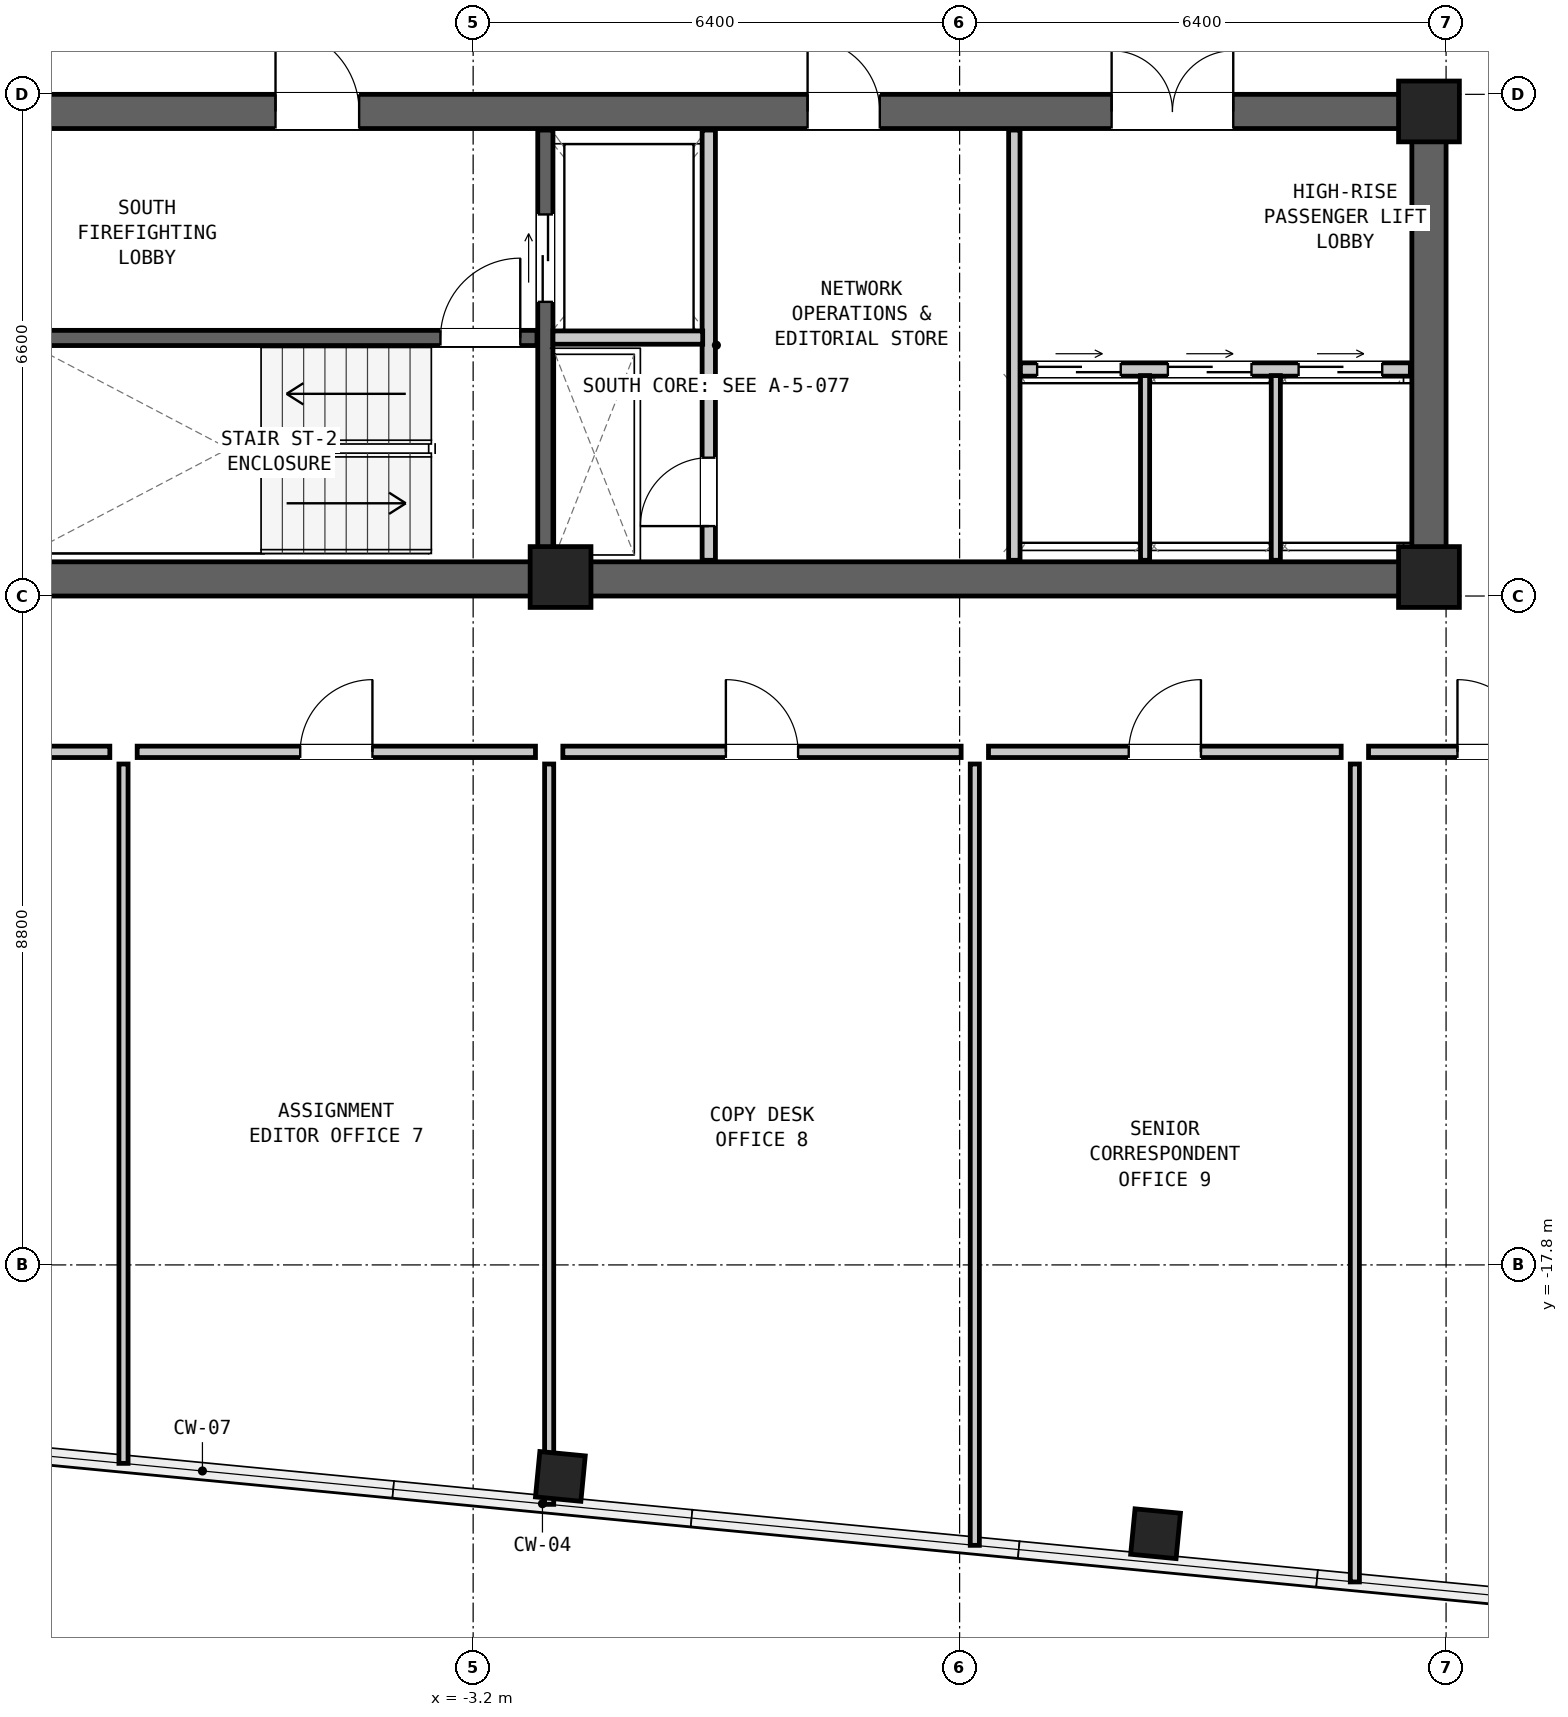
"""IFC4 building model, lengths in metres.
Left out: names, types, materials, properties, quantities, classifications, styles, units other than length and angle.
Written with IfcOpenShell. Run it as: python <this file> out.ifc"""

import sys

from ifc_helpers import new_model, si_unit, direction, frame, frame_2d, origin, origin_2d, place, context, subcontext, project, spatial, rectangle, hollow_rectangle, extrude, element, fill, save


model = new_model("IFC4")
c1 = context("Model", 3, precision=1e-05, world=origin(), true_north=direction((0.0, 1.0)))
c2 = subcontext(c1, "Body", "Model", "MODEL_VIEW")
j1 = project(units=[si_unit("LENGTHUNIT", "METRE"), si_unit("PLANEANGLEUNIT", "RADIAN")], contexts=[c1])
p1 = place(None, origin())
s1 = spatial("IfcSite", under=j1, at=p1, CompositionType="ELEMENT")
p2 = place(p1, origin())
s2 = spatial("IfcBuilding", under=s1, at=p2, CompositionType="ELEMENT")
p3 = place(p2, frame((0.0, 0.0, 252.0)))
s3 = spatial("IfcBuildingStorey", under=s2, at=p3, CompositionType="ELEMENT", Elevation=252.0)
p4 = place(p3, frame((-9.6, -8.775, 0.0), z_axis=(0.0, 0.0, 1.0), x_axis=(1.0, 0.0, 0.0)))
e1 = element("IfcWall", 1, at=p4, inside=s3, PredefinedType="SHEAR", context=c2, shape_type="SweptSolid", body=[
    extrude(rectangle(XDim=19.2, YDim=0.45, at=frame_2d((9.6, 0.0))), origin(), (0.0, 0.0, 1.0), 3.05),
])
p5 = place(p3, frame((-9.6, -2.625, 0.0), z_axis=(0.0, 0.0, 1.0), x_axis=(1.0, 0.0, 0.0)))
e2 = element("IfcWall", 2, at=p5, inside=s3, PredefinedType="SHEAR", context=c2, shape_type="SweptSolid", body=[
    extrude(rectangle(XDim=19.2, YDim=0.45, at=frame_2d((9.6, 0.0))), origin(), (0.0, 0.0, 1.0), 3.05),
])
p6 = place(p5, frame((3.8, 0.0, 0.0)))
e3 = element("IfcOpeningElement", 3, at=p6, cuts=e2, PredefinedType="OPENING", context=c2, shape_type="SweptSolid", body=[
    extrude(rectangle(XDim=1.1, YDim=2.08, at=frame_2d((0.55, 1.04))), frame((0.0, 0.237, 0.0), z_axis=(0.0, -1.0, 0.0), x_axis=(1.0, 0.0, 0.0)), (0.0, 0.0, 1.0), 0.474),
])
p7 = place(p5, frame((10.8, 0.0, 0.0)))
e4 = element("IfcOpeningElement", 4, at=p7, cuts=e2, PredefinedType="OPENING", context=c2, shape_type="SweptSolid", body=[
    extrude(rectangle(XDim=0.95, YDim=2.1, at=frame_2d((0.475, 1.05))), frame((0.0, 0.237, 0.0), z_axis=(0.0, -1.0, 0.0), x_axis=(1.0, 0.0, 0.0)), (0.0, 0.0, 1.0), 0.474),
])
p8 = place(p5, frame((14.8, 0.0, 0.0)))
e5 = element("IfcOpeningElement", 5, at=p8, cuts=e2, PredefinedType="OPENING", context=c2, shape_type="SweptSolid", body=[
    extrude(rectangle(XDim=1.6, YDim=2.12, at=frame_2d((0.8, 1.06))), frame((0.0, 0.237, 0.0), z_axis=(0.0, -1.0, 0.0), x_axis=(1.0, 0.0, 0.0)), (0.0, 0.0, 1.0), 0.474),
])
p9 = place(p3, frame((9.375, -9.0, 0.0), z_axis=(0.0, 0.0, 1.0), x_axis=(0.0, 1.0, 0.0)))
e6 = element("IfcWall", 6, at=p9, inside=s3, PredefinedType="SHEAR", context=c2, shape_type="SweptSolid", body=[
    extrude(rectangle(XDim=6.6, YDim=0.45, at=frame_2d((3.3, 0.0))), origin(), (0.0, 0.0, 1.0), 3.05),
])
for number, where, z_axis, x_axis in (
    (7, (-2.052, -20.583, 0.0), (0.0, 0.0, 1.0), (0.995, -0.096, 0.0)),
    (8, (5.778, -21.336, 0.0), (0.0, 0.0, 1.0), (0.995, -0.096, 0.0)),
):
    element("IfcColumn", number, at=place(p3, frame(where, z_axis=z_axis, x_axis=x_axis)), inside=s3, PredefinedType="COLUMN", context=c2, shape_type="SweptSolid", body=[
        extrude(hollow_rectangle(XDim=0.6, YDim=0.6, WallThickness=0.04, at=origin_2d()), origin(), (0.0, 0.0, 1.0), 3.05),
    ])
for number, where, z_axis, x_axis in (
    (9, (9.375, -2.625, 0.0), (0.0, 0.0, 1.0), (1.0, 0.0, 0.0)),
    (10, (-2.05, -8.75, 0.0), (0.0, 0.0, 1.0), (1.0, 0.0, 0.0)),
    (11, (9.375, -8.75, 0.0), (0.0, 0.0, 1.0), (1.0, 0.0, 0.0)),
):
    element("IfcColumn", number, at=place(p3, frame(where, z_axis=z_axis, x_axis=x_axis)), inside=s3, PredefinedType="COLUMN", context=c2, shape_type="SweptSolid", body=[
        extrude(rectangle(XDim=0.8, YDim=0.8, at=origin_2d()), origin(), (0.0, 0.0, 1.0), 3.05),
    ])
p10 = place(p3, frame((-9.13, -5.605, 0.0), z_axis=(0.0, 0.0, 1.0), x_axis=(1.0, 0.0, 0.0)))
e12 = element("IfcWall", 12, at=p10, inside=s3, PredefinedType="SHEAR", context=c2, shape_type="SweptSolid", body=[
    extrude(rectangle(XDim=6.77, YDim=0.2, at=frame_2d((3.385, 0.0))), origin(), (0.0, 0.0, 1.0), 2.86),
])
p11 = place(p10, frame((5.5, 0.0, 0.0)))
e13 = element("IfcOpeningElement", 13, at=p11, cuts=e12, PredefinedType="OPENING", context=c2, shape_type="SweptSolid", body=[
    extrude(rectangle(XDim=1.05, YDim=2.08, at=frame_2d((0.525, 1.04))), frame((0.0, 0.112, 0.0), z_axis=(0.0, -1.0, 0.0), x_axis=(1.0, 0.0, 0.0)), (0.0, 0.0, 1.0), 0.224),
])
p12 = place(p3, frame((-2.25, -8.53, 0.0), z_axis=(0.0, 0.0, 1.0), x_axis=(0.0, 1.0, 0.0)))
e14 = element("IfcWall", 14, at=p12, inside=s3, PredefinedType="SHEAR", context=c2, shape_type="SweptSolid", body=[
    extrude(rectangle(XDim=5.66, YDim=0.2, at=frame_2d((2.83, 0.0))), origin(), (0.0, 0.0, 1.0), 2.86),
])
p13 = place(p12, frame((3.4, 0.0, 0.0)))
e15 = element("IfcOpeningElement", 15, at=p13, cuts=e14, PredefinedType="OPENING", context=c2, shape_type="SweptSolid", body=[
    extrude(rectangle(XDim=1.15, YDim=2.08, at=frame_2d((0.575, 1.04))), frame((0.0, 0.112, 0.0), z_axis=(0.0, -1.0, 0.0), x_axis=(1.0, 0.0, 0.0)), (0.0, 0.0, 1.0), 0.224),
])
p14 = place(p3, frame((-0.1, -8.53, 0.0), z_axis=(0.0, 0.0, 1.0), x_axis=(0.0, 1.0, 0.0)))
e16 = element("IfcWall", 16, at=p14, inside=s3, PredefinedType="PARTITIONING", context=c2, shape_type="SweptSolid", body=[
    extrude(rectangle(XDim=5.66, YDim=0.175, at=frame_2d((2.83, 0.0))), origin(), (0.0, 0.0, 1.0), 2.86),
])
p15 = place(p14, frame((0.45, 0.0, 0.0)))
e17 = element("IfcOpeningElement", 17, at=p15, cuts=e16, PredefinedType="OPENING", context=c2, shape_type="SweptSolid", body=[
    extrude(rectangle(XDim=0.9, YDim=2.05, at=frame_2d((0.45, 1.025))), frame((0.0, 0.1, 0.0), z_axis=(0.0, -1.0, 0.0), x_axis=(1.0, 0.0, 0.0)), (0.0, 0.0, 1.0), 0.199),
])
p16 = place(p3, frame((-2.15, -5.6, 0.0), z_axis=(0.0, 0.0, 1.0), x_axis=(1.0, 0.0, 0.0)))
e18 = element("IfcWall", 18, at=p16, inside=s3, PredefinedType="PARTITIONING", context=c2, shape_type="SweptSolid", body=[
    extrude(rectangle(XDim=1.97, YDim=0.175, at=frame_2d((0.985, 0.0))), origin(), (0.0, 0.0, 1.0), 2.86),
])
p17 = place(p3, frame((3.92, -8.53, 0.0), z_axis=(0.0, 0.0, 1.0), x_axis=(0.0, 1.0, 0.0)))
e19 = element("IfcWall", 19, at=p17, inside=s3, PredefinedType="PARTITIONING", context=c2, shape_type="SweptSolid", body=[
    extrude(rectangle(XDim=5.66, YDim=0.15, at=frame_2d((2.83, 0.0))), origin(), (0.0, 0.0, 1.0), 2.86),
])
p18 = place(p3, frame((4.0, -6.02, 0.0), z_axis=(0.0, 0.0, 1.0), x_axis=(1.0, 0.0, 0.0)))
e20 = element("IfcWall", 20, at=p18, inside=s3, PredefinedType="PARTITIONING", context=c2, shape_type="SweptSolid", body=[
    extrude(rectangle(XDim=5.13, YDim=0.175, at=frame_2d((2.565, 0.0))), origin(), (0.0, 0.0, 1.0), 2.86),
])
p19 = place(p18, frame((0.22, 0.0, 0.0)))
e21 = element("IfcOpeningElement", 21, at=p19, cuts=e20, PredefinedType="OPENING", context=c2, shape_type="SweptSolid", body=[
    extrude(rectangle(XDim=1.1, YDim=2.06, at=frame_2d((0.55, 1.03))), frame((0.0, 0.1, 0.0), z_axis=(0.0, -1.0, 0.0), x_axis=(1.0, 0.0, 0.0)), (0.0, 0.0, 1.0), 0.199),
])
p20 = place(p18, frame((1.94, 0.0, 0.0)))
e22 = element("IfcOpeningElement", 22, at=p20, cuts=e20, PredefinedType="OPENING", context=c2, shape_type="SweptSolid", body=[
    extrude(rectangle(XDim=1.1, YDim=2.06, at=frame_2d((0.55, 1.03))), frame((0.0, 0.1, 0.0), z_axis=(0.0, -1.0, 0.0), x_axis=(1.0, 0.0, 0.0)), (0.0, 0.0, 1.0), 0.199),
])
p21 = place(p18, frame((3.66, 0.0, 0.0)))
e23 = element("IfcOpeningElement", 23, at=p21, cuts=e20, PredefinedType="OPENING", context=c2, shape_type="SweptSolid", body=[
    extrude(rectangle(XDim=1.1, YDim=2.06, at=frame_2d((0.55, 1.03))), frame((0.0, 0.1, 0.0), z_axis=(0.0, -1.0, 0.0), x_axis=(1.0, 0.0, 0.0)), (0.0, 0.0, 1.0), 0.199),
])
for number, where, z_axis, x_axis in (
    (24, (5.64, -8.53, 0.0), (0.0, 0.0, 1.0), (0.0, 1.0, 0.0)),
    (25, (7.36, -8.53, 0.0), (0.0, 0.0, 1.0), (0.0, 1.0, 0.0)),
):
    element("IfcWall", number, at=place(p3, frame(where, z_axis=z_axis, x_axis=x_axis)), inside=s3, PredefinedType="PARTITIONING", context=c2, shape_type="SweptSolid", body=[
        extrude(rectangle(XDim=2.43, YDim=0.12, at=frame_2d((1.215, 0.0))), origin(), (0.0, 0.0, 1.0), 2.86),
    ])
p22 = place(p3, frame((-7.8, -20.411, 0.0), z_axis=(0.0, 0.0, 1.0), x_axis=(0.0, 1.0, 0.0)))
e26 = element("IfcWall", 26, at=p22, inside=s3, PredefinedType="PARTITIONING", context=c2, shape_type="SweptSolid", body=[
    extrude(rectangle(XDim=9.201, YDim=0.12, at=frame_2d((4.6, 0.0))), origin(), (0.0, 0.0, 1.0), 2.86),
])
p23 = place(p3, frame((-2.2, -20.95, 0.0), z_axis=(0.0, 0.0, 1.0), x_axis=(0.0, 1.0, 0.0)))
e27 = element("IfcWall", 27, at=p23, inside=s3, PredefinedType="PARTITIONING", context=c2, shape_type="SweptSolid", body=[
    extrude(rectangle(XDim=9.74, YDim=0.12, at=frame_2d((4.87, 0.0))), origin(), (0.0, 0.0, 1.0), 2.86),
])
p24 = place(p3, frame((3.4, -21.489, 0.0), z_axis=(0.0, 0.0, 1.0), x_axis=(0.0, 1.0, 0.0)))
e28 = element("IfcWall", 28, at=p24, inside=s3, PredefinedType="PARTITIONING", context=c2, shape_type="SweptSolid", body=[
    extrude(rectangle(XDim=10.279, YDim=0.12, at=frame_2d((5.14, 0.0))), origin(), (0.0, 0.0, 1.0), 2.381),
])
p25 = place(p3, frame((8.4, -21.971, 0.0), z_axis=(0.0, 0.0, 1.0), x_axis=(0.0, 1.0, 0.0)))
e29 = element("IfcWall", 29, at=p25, inside=s3, PredefinedType="PARTITIONING", context=c2, shape_type="SweptSolid", body=[
    extrude(rectangle(XDim=10.761, YDim=0.12, at=frame_2d((5.38, 0.0))), origin(), (0.0, 0.0, 1.0), 2.86),
])
p26 = place(p3, frame((-11.12, -11.05, 0.0), z_axis=(0.0, 0.0, 1.0), x_axis=(1.0, 0.0, 0.0)))
e30 = element("IfcWall", 30, at=p26, inside=s3, PredefinedType="PARTITIONING", context=c2, shape_type="SweptSolid", body=[
    extrude(rectangle(XDim=3.14, YDim=0.15, at=frame_2d((1.57, 0.0))), origin(), (0.0, 0.0, 1.0), 2.86),
])
p27 = place(p26, frame((0.295, 0.0, 0.0)))
e31 = element("IfcOpeningElement", 31, at=p27, cuts=e30, PredefinedType="OPENING", context=c2, shape_type="SweptSolid", body=[
    extrude(rectangle(XDim=0.95, YDim=2.1, at=frame_2d((0.475, 1.05))), frame((0.0, 0.087, 0.0), z_axis=(0.0, -1.0, 0.0), x_axis=(1.0, 0.0, 0.0)), (0.0, 0.0, 1.0), 0.174),
])
p28 = place(p3, frame((-7.62, -11.05, 0.0), z_axis=(0.0, 0.0, 1.0), x_axis=(1.0, 0.0, 0.0)))
e32 = element("IfcWall", 32, at=p28, inside=s3, PredefinedType="PARTITIONING", context=c2, shape_type="SweptSolid", body=[
    extrude(rectangle(XDim=5.24, YDim=0.15, at=frame_2d((2.62, 0.0))), origin(), (0.0, 0.0, 1.0), 2.86),
])
p29 = place(p28, frame((2.145, 0.0, 0.0)))
e33 = element("IfcOpeningElement", 33, at=p29, cuts=e32, PredefinedType="OPENING", context=c2, shape_type="SweptSolid", body=[
    extrude(rectangle(XDim=0.95, YDim=2.1, at=frame_2d((0.475, 1.05))), frame((0.0, 0.087, 0.0), z_axis=(0.0, -1.0, 0.0), x_axis=(1.0, 0.0, 0.0)), (0.0, 0.0, 1.0), 0.174),
])
p30 = place(p3, frame((-2.02, -11.05, 0.0), z_axis=(0.0, 0.0, 1.0), x_axis=(1.0, 0.0, 0.0)))
e34 = element("IfcWall", 34, at=p30, inside=s3, PredefinedType="PARTITIONING", context=c2, shape_type="SweptSolid", body=[
    extrude(rectangle(XDim=5.24, YDim=0.15, at=frame_2d((2.62, 0.0))), origin(), (0.0, 0.0, 1.0), 2.86),
])
p31 = place(p30, frame((2.145, 0.0, 0.0)))
e35 = element("IfcOpeningElement", 35, at=p31, cuts=e34, PredefinedType="OPENING", context=c2, shape_type="SweptSolid", body=[
    extrude(rectangle(XDim=0.95, YDim=2.1, at=frame_2d((0.475, 1.05))), frame((0.0, 0.087, 0.0), z_axis=(0.0, -1.0, 0.0), x_axis=(1.0, 0.0, 0.0)), (0.0, 0.0, 1.0), 0.174),
])
p32 = place(p3, frame((3.58, -11.05, 0.0), z_axis=(0.0, 0.0, 1.0), x_axis=(1.0, 0.0, 0.0)))
e36 = element("IfcWall", 36, at=p32, inside=s3, PredefinedType="PARTITIONING", context=c2, shape_type="SweptSolid", body=[
    extrude(rectangle(XDim=4.64, YDim=0.15, at=frame_2d((2.32, 0.0))), origin(), (0.0, 0.0, 1.0), 2.86),
])
p33 = place(p32, frame((1.845, 0.0, 0.0)))
e37 = element("IfcOpeningElement", 37, at=p33, cuts=e36, PredefinedType="OPENING", context=c2, shape_type="SweptSolid", body=[
    extrude(rectangle(XDim=0.95, YDim=2.1, at=frame_2d((0.475, 1.05))), frame((0.0, 0.087, 0.0), z_axis=(0.0, -1.0, 0.0), x_axis=(1.0, 0.0, 0.0)), (0.0, 0.0, 1.0), 0.174),
])
p34 = place(p3, frame((8.58, -11.05, 0.0), z_axis=(0.0, 0.0, 1.0), x_axis=(1.0, 0.0, 0.0)))
e38 = element("IfcWall", 38, at=p34, inside=s3, PredefinedType="PARTITIONING", context=c2, shape_type="SweptSolid", body=[
    extrude(rectangle(XDim=2.89, YDim=0.15, at=frame_2d((1.445, 0.0))), origin(), (0.0, 0.0, 1.0), 2.86),
])
p35 = place(p34, frame((1.17, 0.0, 0.0)))
e39 = element("IfcOpeningElement", 39, at=p35, cuts=e38, PredefinedType="OPENING", context=c2, shape_type="SweptSolid", body=[
    extrude(rectangle(XDim=0.95, YDim=2.1, at=frame_2d((0.475, 1.05))), frame((0.0, 0.087, 0.0), z_axis=(0.0, -1.0, 0.0), x_axis=(1.0, 0.0, 0.0)), (0.0, 0.0, 1.0), 0.174),
])
p36 = place(p11, origin())
e40 = element("IfcDoor", 40, at=p36, inside=s3, OperationType="SINGLE_SWING_RIGHT", PredefinedType="DOOR", context=c2, shape_type="SweptSolid", body=[
    extrude(rectangle(XDim=1.05, YDim=2.08, at=frame_2d((0.525, 1.04))), frame((0.0, 0.025, 0.0), z_axis=(0.0, -1.0, 0.0), x_axis=(1.0, 0.0, 0.0)), (0.0, 0.0, 1.0), 0.05),
])
fill(e13, e40)
p37 = place(p6, origin())
e41 = element("IfcDoor", 41, at=p37, inside=s3, OperationType="SINGLE_SWING_LEFT", PredefinedType="DOOR", context=c2, shape_type="SweptSolid", body=[
    extrude(rectangle(XDim=1.1, YDim=2.08, at=frame_2d((0.55, 1.04))), frame((0.0, 0.025, 0.0), z_axis=(0.0, -1.0, 0.0), x_axis=(1.0, 0.0, 0.0)), (0.0, 0.0, 1.0), 0.05),
])
fill(e3, e41)
p38 = place(p13, origin())
e42 = element("IfcDoor", 42, at=p38, inside=s3, OperationType="DOUBLE_DOOR_SLIDING", PredefinedType="DOOR", context=c2, shape_type="SweptSolid", body=[
    extrude(rectangle(XDim=1.15, YDim=2.08, at=frame_2d((0.575, 1.04))), frame((0.0, 0.025, 0.0), z_axis=(0.0, -1.0, 0.0), x_axis=(1.0, 0.0, 0.0)), (0.0, 0.0, 1.0), 0.05),
])
fill(e15, e42)
p39 = place(p15, origin())
e43 = element("IfcDoor", 43, at=p39, inside=s3, OperationType="SINGLE_SWING_LEFT", PredefinedType="DOOR", context=c2, shape_type="SweptSolid", body=[
    extrude(rectangle(XDim=0.9, YDim=2.05, at=frame_2d((0.45, 1.025))), frame((0.0, 0.025, 0.0), z_axis=(0.0, -1.0, 0.0), x_axis=(1.0, 0.0, 0.0)), (0.0, 0.0, 1.0), 0.05),
])
fill(e17, e43)
p40 = place(p7, origin())
e44 = element("IfcDoor", 44, at=p40, inside=s3, OperationType="SINGLE_SWING_LEFT", PredefinedType="DOOR", context=c2, shape_type="SweptSolid", body=[
    extrude(rectangle(XDim=0.95, YDim=2.1, at=frame_2d((0.475, 1.05))), frame((0.0, 0.025, 0.0), z_axis=(0.0, -1.0, 0.0), x_axis=(1.0, 0.0, 0.0)), (0.0, 0.0, 1.0), 0.05),
])
fill(e4, e44)
p41 = place(p19, origin())
e45 = element("IfcDoor", 45, at=p41, inside=s3, OperationType="DOUBLE_DOOR_SLIDING", PredefinedType="DOOR", context=c2, shape_type="SweptSolid", body=[
    extrude(rectangle(XDim=1.1, YDim=2.06, at=frame_2d((0.55, 1.03))), frame((0.0, 0.025, 0.0), z_axis=(0.0, -1.0, 0.0), x_axis=(1.0, 0.0, 0.0)), (0.0, 0.0, 1.0), 0.05),
])
fill(e21, e45)
p42 = place(p20, origin())
e46 = element("IfcDoor", 46, at=p42, inside=s3, OperationType="DOUBLE_DOOR_SLIDING", PredefinedType="DOOR", context=c2, shape_type="SweptSolid", body=[
    extrude(rectangle(XDim=1.1, YDim=2.06, at=frame_2d((0.55, 1.03))), frame((0.0, 0.025, 0.0), z_axis=(0.0, -1.0, 0.0), x_axis=(1.0, 0.0, 0.0)), (0.0, 0.0, 1.0), 0.05),
])
fill(e22, e46)
p43 = place(p21, origin())
e47 = element("IfcDoor", 47, at=p43, inside=s3, OperationType="DOUBLE_DOOR_SLIDING", PredefinedType="DOOR", context=c2, shape_type="SweptSolid", body=[
    extrude(rectangle(XDim=1.1, YDim=2.06, at=frame_2d((0.55, 1.03))), frame((0.0, 0.025, 0.0), z_axis=(0.0, -1.0, 0.0), x_axis=(1.0, 0.0, 0.0)), (0.0, 0.0, 1.0), 0.05),
])
fill(e23, e47)
p44 = place(p8, origin())
e48 = element("IfcDoor", 48, at=p44, inside=s3, OperationType="DOUBLE_DOOR_SINGLE_SWING", PredefinedType="DOOR", context=c2, shape_type="SweptSolid", body=[
    extrude(rectangle(XDim=1.6, YDim=2.12, at=frame_2d((0.8, 1.06))), frame((0.0, 0.025, 0.0), z_axis=(0.0, -1.0, 0.0), x_axis=(1.0, 0.0, 0.0)), (0.0, 0.0, 1.0), 0.05),
])
fill(e5, e48)
p45 = place(p29, origin())
e49 = element("IfcDoor", 49, at=p45, inside=s3, OperationType="SINGLE_SWING_RIGHT", PredefinedType="DOOR", context=c2, shape_type="SweptSolid", body=[
    extrude(rectangle(XDim=0.95, YDim=2.1, at=frame_2d((0.475, 1.05))), frame((0.0, 0.025, 0.0), z_axis=(0.0, -1.0, 0.0), x_axis=(1.0, 0.0, 0.0)), (0.0, 0.0, 1.0), 0.05),
])
fill(e33, e49)
p46 = place(p31, origin())
e50 = element("IfcDoor", 50, at=p46, inside=s3, OperationType="SINGLE_SWING_LEFT", PredefinedType="DOOR", context=c2, shape_type="SweptSolid", body=[
    extrude(rectangle(XDim=0.95, YDim=2.1, at=frame_2d((0.475, 1.05))), frame((0.0, 0.025, 0.0), z_axis=(0.0, -1.0, 0.0), x_axis=(1.0, 0.0, 0.0)), (0.0, 0.0, 1.0), 0.05),
])
fill(e35, e50)
p47 = place(p33, origin())
e51 = element("IfcDoor", 51, at=p47, inside=s3, OperationType="SINGLE_SWING_RIGHT", PredefinedType="DOOR", context=c2, shape_type="SweptSolid", body=[
    extrude(rectangle(XDim=0.95, YDim=2.1, at=frame_2d((0.475, 1.05))), frame((0.0, 0.025, 0.0), z_axis=(0.0, -1.0, 0.0), x_axis=(1.0, 0.0, 0.0)), (0.0, 0.0, 1.0), 0.05),
])
fill(e37, e51)
p48 = place(p35, origin())
e52 = element("IfcDoor", 52, at=p48, inside=s3, OperationType="SINGLE_SWING_LEFT", PredefinedType="DOOR", context=c2, shape_type="SweptSolid", body=[
    extrude(rectangle(XDim=0.95, YDim=2.1, at=frame_2d((0.475, 1.05))), frame((0.0, 0.025, 0.0), z_axis=(0.0, -1.0, 0.0), x_axis=(1.0, 0.0, 0.0)), (0.0, 0.0, 1.0), 0.05),
])
fill(e39, e52)
save(model, sys.argv[1])
